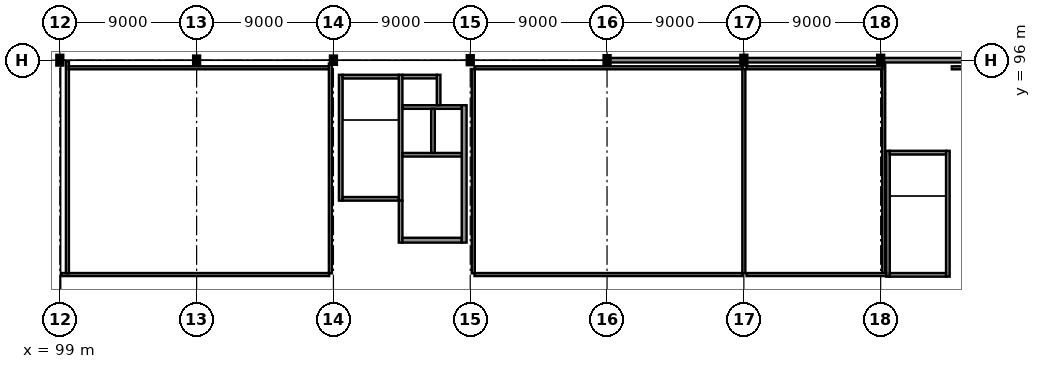
"""IFC4 building model, lengths in metres.
Left out: names, types, materials, properties, quantities, classifications, styles, units other than length and angle.
Written with IfcOpenShell. Run it as: python <this file> out.ifc"""

import sys

from ifc_helpers import new_model, si_unit, direction, frame, frame_2d, origin, origin_2d, place, context, subcontext, project, spatial, rectangle, i_section, extrude, element, fill, save


model = new_model("IFC4")
c1 = context("Model", 3, precision=1e-05, world=origin(), true_north=direction((0.0, 1.0)))
c2 = subcontext(c1, "Body", "Model", "MODEL_VIEW")
j1 = project(units=[si_unit("LENGTHUNIT", "METRE"), si_unit("PLANEANGLEUNIT", "RADIAN")], contexts=[c1])
p1 = place(None, origin())
s1 = spatial("IfcSite", under=j1, at=p1, CompositionType="ELEMENT")
p2 = place(p1, origin())
s2 = spatial("IfcBuilding", under=s1, at=p2, CompositionType="ELEMENT")
p3 = place(p2, frame((0.0, 0.0, 14.4)))
s3 = spatial("IfcBuildingStorey", under=s2, at=p3, CompositionType="ELEMENT", Elevation=14.4)
p4 = place(p3, frame((99.0, 96.0, 0.0), z_axis=(0.0, 0.0, 1.0), x_axis=(1.0, 0.0, 0.0)))
e1 = element("IfcColumn", 1, at=p4, inside=s3, PredefinedType="COLUMN", context=c2, shape_type="SweptSolid", body=[
    extrude(i_section(OverallWidth=0.3, OverallDepth=0.55, WebThickness=0.015, FlangeThickness=0.029, at=origin_2d()), origin(), (0.0, 0.0, 1.0), 4.5),
])
for number, where, z_axis, x_axis in (
    (2, (108.0, 96.0, 0.0), (0.0, 0.0, 1.0), (1.0, 0.0, 0.0)),
    (3, (117.0, 96.0, 0.0), (0.0, 0.0, 1.0), (1.0, 0.0, 0.0)),
):
    element("IfcColumn", number, at=place(p3, frame(where, z_axis=z_axis, x_axis=x_axis)), inside=s3, PredefinedType="COLUMN", context=c2, shape_type="SweptSolid", body=[
        extrude(i_section(OverallWidth=0.3, OverallDepth=0.45, WebThickness=0.014, FlangeThickness=0.026, at=origin_2d()), origin(), (0.0, 0.0, 1.0), 4.5),
    ])
for number, where, z_axis, x_axis in (
    (4, (126.0, 96.0, 0.0), (0.0, 0.0, 1.0), (0.0, 1.0, 0.0)),
    (5, (135.0, 96.0, 0.0), (0.0, 0.0, 1.0), (1.0, 0.0, 0.0)),
):
    element("IfcColumn", number, at=place(p3, frame(where, z_axis=z_axis, x_axis=x_axis)), inside=s3, PredefinedType="COLUMN", context=c2, shape_type="SweptSolid", body=[
        extrude(i_section(OverallWidth=0.3, OverallDepth=0.5, WebThickness=0.014, FlangeThickness=0.028, at=origin_2d()), origin(), (0.0, 0.0, 1.0), 4.5),
    ])
for number, where, z_axis, x_axis in (
    (6, (144.0, 96.0, 0.0), (0.0, 0.0, 1.0), (1.0, 0.0, 0.0)),
    (7, (153.0, 96.0, 0.0), (0.0, 0.0, 1.0), (1.0, 0.0, 0.0)),
):
    element("IfcColumn", number, at=place(p3, frame(where, z_axis=z_axis, x_axis=x_axis)), inside=s3, PredefinedType="COLUMN", context=c2, shape_type="SweptSolid", body=[
        extrude(i_section(OverallWidth=0.3, OverallDepth=0.55, WebThickness=0.015, FlangeThickness=0.029, at=origin_2d()), origin(), (0.0, 0.0, 1.0), 4.5),
    ])
p5 = place(p3, frame((161.992, 96.0, 0.0), z_axis=(0.0, 0.0, 1.0), x_axis=(-1.0, 0.0, 0.0)))
e8 = element("IfcWall", 8, at=p5, inside=s3, PredefinedType="SOLIDWALL", context=c2, shape_type="SweptSolid", body=[
    extrude(rectangle(XDim=8.984, YDim=0.3, at=frame_2d((4.492, 0.0))), origin(), (0.0, 0.0, 1.0), 3.187),
])
p6 = place(p5, frame((2.045, 0.0, 0.9)))
e9 = element("IfcOpeningElement", 9, at=p6, cuts=e8, PredefinedType="OPENING", context=c2, shape_type="SweptSolid", body=[
    extrude(rectangle(XDim=1.3, YDim=1.3, at=frame_2d((0.65, 0.65))), frame((0.0, 0.165, 0.0), z_axis=(0.0, -1.0, 0.0), x_axis=(1.0, 0.0, 0.0)), (0.0, 0.0, 1.0), 0.33),
])
p7 = place(p5, frame((5.639, 0.0, 0.9)))
e10 = element("IfcOpeningElement", 10, at=p7, cuts=e8, PredefinedType="OPENING", context=c2, shape_type="SweptSolid", body=[
    extrude(rectangle(XDim=1.3, YDim=1.3, at=frame_2d((0.65, 0.65))), frame((0.0, 0.165, 0.0), z_axis=(0.0, -1.0, 0.0), x_axis=(1.0, 0.0, 0.0)), (0.0, 0.0, 1.0), 0.33),
])
p8 = place(p3, frame((152.992, 96.0, 0.0), z_axis=(0.0, 0.0, 1.0), x_axis=(-1.0, 0.0, 0.0)))
e11 = element("IfcWall", 11, at=p8, inside=s3, PredefinedType="SOLIDWALL", context=c2, shape_type="SweptSolid", body=[
    extrude(rectangle(XDim=8.984, YDim=0.3, at=frame_2d((4.492, 0.0))), origin(), (0.0, 0.0, 1.0), 3.187),
])
p9 = place(p8, frame((2.045, 0.0, 0.9)))
e12 = element("IfcOpeningElement", 12, at=p9, cuts=e11, PredefinedType="OPENING", context=c2, shape_type="SweptSolid", body=[
    extrude(rectangle(XDim=1.3, YDim=1.3, at=frame_2d((0.65, 0.65))), frame((0.0, 0.165, 0.0), z_axis=(0.0, -1.0, 0.0), x_axis=(1.0, 0.0, 0.0)), (0.0, 0.0, 1.0), 0.33),
])
p10 = place(p8, frame((5.639, 0.0, 0.9)))
e13 = element("IfcOpeningElement", 13, at=p10, cuts=e11, PredefinedType="OPENING", context=c2, shape_type="SweptSolid", body=[
    extrude(rectangle(XDim=1.3, YDim=1.3, at=frame_2d((0.65, 0.65))), frame((0.0, 0.165, 0.0), z_axis=(0.0, -1.0, 0.0), x_axis=(1.0, 0.0, 0.0)), (0.0, 0.0, 1.0), 0.33),
])
p11 = place(p3, frame((143.992, 96.0, 0.0), z_axis=(0.0, 0.0, 1.0), x_axis=(-1.0, 0.0, 0.0)))
e14 = element("IfcWall", 14, at=p11, inside=s3, PredefinedType="SOLIDWALL", context=c2, shape_type="SweptSolid", body=[
    extrude(rectangle(XDim=8.984, YDim=0.3, at=frame_2d((4.492, 0.0))), origin(), (0.0, 0.0, 1.0), 3.187),
])
p12 = place(p11, frame((2.045, 0.0, 0.9)))
e15 = element("IfcOpeningElement", 15, at=p12, cuts=e14, PredefinedType="OPENING", context=c2, shape_type="SweptSolid", body=[
    extrude(rectangle(XDim=1.3, YDim=1.3, at=frame_2d((0.65, 0.65))), frame((0.0, 0.165, 0.0), z_axis=(0.0, -1.0, 0.0), x_axis=(1.0, 0.0, 0.0)), (0.0, 0.0, 1.0), 0.33),
])
p13 = place(p11, frame((5.639, 0.0, 0.9)))
e16 = element("IfcOpeningElement", 16, at=p13, cuts=e14, PredefinedType="OPENING", context=c2, shape_type="SweptSolid", body=[
    extrude(rectangle(XDim=1.3, YDim=1.3, at=frame_2d((0.65, 0.65))), frame((0.0, 0.165, 0.0), z_axis=(0.0, -1.0, 0.0), x_axis=(1.0, 0.0, 0.0)), (0.0, 0.0, 1.0), 0.33),
])
p14 = place(p3, frame((117.48, 86.76, 0.0), z_axis=(0.0, 0.0, 1.0), x_axis=(0.0, 1.0, 0.0)))
e17 = element("IfcWall", 17, at=p14, inside=s3, PredefinedType="SHEAR", context=c2, shape_type="SweptSolid", body=[
    extrude(rectangle(XDim=8.28, YDim=0.24, at=frame_2d((4.14, 0.0))), origin(), (0.0, 0.0, 1.0), 4.31),
])
p15 = place(p3, frame((121.42, 86.76, 0.0), z_axis=(0.0, 0.0, 1.0), x_axis=(0.0, 1.0, 0.0)))
e18 = element("IfcWall", 18, at=p15, inside=s3, PredefinedType="SHEAR", context=c2, shape_type="SweptSolid", body=[
    extrude(rectangle(XDim=8.28, YDim=0.24, at=frame_2d((4.14, 0.0))), origin(), (0.0, 0.0, 1.0), 4.31),
])
p16 = place(p15, frame((0.54, 0.0, 0.0)))
e19 = element("IfcOpeningElement", 19, at=p16, cuts=e18, PredefinedType="OPENING", context=c2, shape_type="SweptSolid", body=[
    extrude(rectangle(XDim=1.2, YDim=2.15, at=frame_2d((0.6, 1.075))), frame((0.0, 0.135, 0.0), z_axis=(0.0, -1.0, 0.0), x_axis=(1.0, 0.0, 0.0)), (0.0, 0.0, 1.0), 0.27),
])
for number, where, z_axis, x_axis in (
    (20, (117.6, 86.88, 0.0), (0.0, 0.0, 1.0), (1.0, 0.0, 0.0)),
    (21, (117.6, 94.92, 0.0), (0.0, 0.0, 1.0), (1.0, 0.0, 0.0)),
):
    element("IfcWall", number, at=place(p3, frame(where, z_axis=z_axis, x_axis=x_axis)), inside=s3, PredefinedType="SHEAR", context=c2, shape_type="SweptSolid", body=[
        extrude(rectangle(XDim=3.7, YDim=0.24, at=frame_2d((1.85, 0.0))), origin(), (0.0, 0.0, 1.0), 4.31),
    ])
p17 = place(p3, frame((153.48, 81.76, 0.0), z_axis=(0.0, 0.0, 1.0), x_axis=(0.0, 1.0, 0.0)))
e22 = element("IfcWall", 22, at=p17, inside=s3, PredefinedType="SHEAR", context=c2, shape_type="SweptSolid", body=[
    extrude(rectangle(XDim=8.28, YDim=0.24, at=frame_2d((4.14, 0.0))), origin(), (0.0, 0.0, 1.0), 4.31),
])
p18 = place(p3, frame((157.42, 81.76, 0.0), z_axis=(0.0, 0.0, 1.0), x_axis=(0.0, 1.0, 0.0)))
e23 = element("IfcWall", 23, at=p18, inside=s3, PredefinedType="SHEAR", context=c2, shape_type="SweptSolid", body=[
    extrude(rectangle(XDim=8.28, YDim=0.24, at=frame_2d((4.14, 0.0))), origin(), (0.0, 0.0, 1.0), 4.31),
])
p19 = place(p18, frame((0.49, 0.0, 0.0)))
e24 = element("IfcOpeningElement", 24, at=p19, cuts=e23, PredefinedType="OPENING", context=c2, shape_type="SweptSolid", body=[
    extrude(rectangle(XDim=1.3, YDim=2.2, at=frame_2d((0.65, 1.1))), frame((0.0, 0.135, 0.0), z_axis=(0.0, -1.0, 0.0), x_axis=(1.0, 0.0, 0.0)), (0.0, 0.0, 1.0), 0.27),
])
for number, where, z_axis, x_axis in (
    (25, (153.6, 81.88, 0.0), (0.0, 0.0, 1.0), (1.0, 0.0, 0.0)),
    (26, (153.6, 89.92, 0.0), (0.0, 0.0, 1.0), (1.0, 0.0, 0.0)),
):
    element("IfcWall", number, at=place(p3, frame(where, z_axis=z_axis, x_axis=x_axis)), inside=s3, PredefinedType="SHEAR", context=c2, shape_type="SweptSolid", body=[
        extrude(rectangle(XDim=3.7, YDim=0.24, at=frame_2d((1.85, 0.0))), origin(), (0.0, 0.0, 1.0), 4.31),
    ])
p20 = place(p3, frame((121.42, 84.0, 0.0), z_axis=(0.0, 0.0, 1.0), x_axis=(0.0, 1.0, 0.0)))
e27 = element("IfcWall", 27, at=p20, inside=s3, PredefinedType="SHEAR", context=c2, shape_type="SweptSolid", body=[
    extrude(rectangle(XDim=2.76, YDim=0.24, at=frame_2d((1.38, 0.0))), origin(), (0.0, 0.0, 1.0), 4.16),
])
p21 = place(p3, frame((121.54, 84.16, 0.0), z_axis=(0.0, 0.0, 1.0), x_axis=(1.0, 0.0, 0.0)))
e28 = element("IfcWall", 28, at=p21, inside=s3, PredefinedType="SHEAR", context=c2, shape_type="SweptSolid", body=[
    extrude(rectangle(XDim=3.9, YDim=0.32, at=frame_2d((1.95, 0.0))), origin(), (0.0, 0.0, 1.0), 4.16),
])
p22 = place(p21, frame((1.225, 0.0, 0.0)))
e29 = element("IfcOpeningElement", 29, at=p22, cuts=e28, PredefinedType="OPENING", context=c2, shape_type="SweptSolid", body=[
    extrude(rectangle(XDim=1.45, YDim=2.2, at=frame_2d((0.725, 1.1))), frame((0.0, 0.175, 0.0), z_axis=(0.0, -1.0, 0.0), x_axis=(1.0, 0.0, 0.0)), (0.0, 0.0, 1.0), 0.35),
])
p23 = place(p3, frame((125.6, 84.0, 0.0), z_axis=(0.0, 0.0, 1.0), x_axis=(0.0, 1.0, 0.0)))
e30 = element("IfcWall", 30, at=p23, inside=s3, PredefinedType="SHEAR", context=c2, shape_type="SweptSolid", body=[
    extrude(rectangle(XDim=9.04, YDim=0.32, at=frame_2d((4.52, 0.0))), origin(), (0.0, 0.0, 1.0), 4.16),
])
p24 = place(p3, frame((121.54, 89.78, 0.0), z_axis=(0.0, 0.0, 1.0), x_axis=(1.0, 0.0, 0.0)))
e31 = element("IfcWall", 31, at=p24, inside=s3, PredefinedType="SHEAR", context=c2, shape_type="SweptSolid", body=[
    extrude(rectangle(XDim=3.9, YDim=0.24, at=frame_2d((1.95, 0.0))), origin(), (0.0, 0.0, 1.0), 4.31),
])
p25 = place(p24, frame((0.385, 0.0, 0.0)))
e32 = element("IfcOpeningElement", 32, at=p25, cuts=e31, PredefinedType="OPENING", context=c2, shape_type="SweptSolid", body=[
    extrude(rectangle(XDim=1.3, YDim=2.2, at=frame_2d((0.65, 1.1))), frame((0.0, 0.135, 0.0), z_axis=(0.0, -1.0, 0.0), x_axis=(1.0, 0.0, 0.0)), (0.0, 0.0, 1.0), 0.27),
])
p26 = place(p24, frame((2.335, 0.0, 0.0)))
e33 = element("IfcOpeningElement", 33, at=p26, cuts=e31, PredefinedType="OPENING", context=c2, shape_type="SweptSolid", body=[
    extrude(rectangle(XDim=1.3, YDim=2.2, at=frame_2d((0.65, 1.1))), frame((0.0, 0.135, 0.0), z_axis=(0.0, -1.0, 0.0), x_axis=(1.0, 0.0, 0.0)), (0.0, 0.0, 1.0), 0.27),
])
p27 = place(p3, frame((121.54, 92.92, 0.0), z_axis=(0.0, 0.0, 1.0), x_axis=(1.0, 0.0, 0.0)))
e34 = element("IfcWall", 34, at=p27, inside=s3, PredefinedType="SHEAR", context=c2, shape_type="SweptSolid", body=[
    extrude(rectangle(XDim=3.9, YDim=0.24, at=frame_2d((1.95, 0.0))), origin(), (0.0, 0.0, 1.0), 4.31),
])
p28 = place(p3, frame((123.55, 89.9, 0.0), z_axis=(0.0, 0.0, 1.0), x_axis=(0.0, 1.0, 0.0)))
e35 = element("IfcWall", 35, at=p28, inside=s3, PredefinedType="SHEAR", context=c2, shape_type="SweptSolid", body=[
    extrude(rectangle(XDim=2.9, YDim=0.24, at=frame_2d((1.45, 0.0))), origin(), (0.0, 0.0, 1.0), 4.31),
])
p29 = place(p3, frame((123.92, 93.04, 0.0), z_axis=(0.0, 0.0, 1.0), x_axis=(0.0, 1.0, 0.0)))
e36 = element("IfcWall", 36, at=p29, inside=s3, PredefinedType="SHEAR", context=c2, shape_type="SweptSolid", body=[
    extrude(rectangle(XDim=2.0, YDim=0.24, at=frame_2d((1.0, 0.0))), origin(), (0.0, 0.0, 1.0), 4.31),
])
p30 = place(p3, frame((121.54, 94.92, 0.0), z_axis=(0.0, 0.0, 1.0), x_axis=(1.0, 0.0, 0.0)))
e37 = element("IfcWall", 37, at=p30, inside=s3, PredefinedType="SHEAR", context=c2, shape_type="SweptSolid", body=[
    extrude(rectangle(XDim=2.26, YDim=0.24, at=frame_2d((1.13, 0.0))), origin(), (0.0, 0.0, 1.0), 4.31),
])
p31 = place(p3, frame((116.72, 81.9, 0.0), z_axis=(0.0, 0.0, 1.0), x_axis=(-1.0, 0.0, 0.0)))
e38 = element("IfcWall", 38, at=p31, inside=s3, PredefinedType="PARTITIONING", context=c2, shape_type="SweptSolid", body=[
    extrude(rectangle(XDim=17.595, YDim=0.2, at=frame_2d((8.797, 0.0))), origin(), (0.0, 0.0, 1.0), 4.14),
])
p32 = place(p31, frame((7.947, 0.0, 0.0)))
e39 = element("IfcOpeningElement", 39, at=p32, cuts=e38, PredefinedType="OPENING", context=c2, shape_type="SweptSolid", body=[
    extrude(rectangle(XDim=1.7, YDim=2.4, at=frame_2d((0.85, 1.2))), frame((0.0, 0.115, 0.0), z_axis=(0.0, -1.0, 0.0), x_axis=(1.0, 0.0, 0.0)), (0.0, 0.0, 1.0), 0.23),
])
p33 = place(p3, frame((99.5, 81.98, 0.0), z_axis=(0.0, 0.0, 1.0), x_axis=(0.0, 1.0, 0.0)))
e40 = element("IfcWall", 40, at=p33, inside=s3, PredefinedType="PARTITIONING", context=c2, shape_type="SweptSolid", body=[
    extrude(rectangle(XDim=13.945, YDim=0.2, at=frame_2d((6.973, 0.0))), origin(), (0.0, 0.0, 1.0), 4.14),
])
p34 = place(p3, frame((99.58, 95.5, 0.0), z_axis=(0.0, 0.0, 1.0), x_axis=(1.0, 0.0, 0.0)))
e41 = element("IfcWall", 41, at=p34, inside=s3, PredefinedType="PARTITIONING", context=c2, shape_type="SweptSolid", body=[
    extrude(rectangle(XDim=17.14, YDim=0.2, at=frame_2d((8.57, 0.0))), origin(), (0.0, 0.0, 1.0), 4.14),
])
p35 = place(p3, frame((116.8, 95.777, 0.0), z_axis=(0.0, 0.0, 1.0), x_axis=(0.0, -1.0, 0.0)))
e42 = element("IfcWall", 42, at=p35, inside=s3, PredefinedType="PARTITIONING", context=c2, shape_type="SweptSolid", body=[
    extrude(rectangle(XDim=13.797, YDim=0.2, at=frame_2d((6.898, 0.0))), origin(), (0.0, 0.0, 1.0), 3.505),
])
p36 = place(p3, frame((126.2, 81.98, 0.0), z_axis=(0.0, 0.0, 1.0), x_axis=(0.0, 1.0, 0.0)))
e43 = element("IfcWall", 43, at=p36, inside=s3, PredefinedType="PARTITIONING", context=c2, shape_type="SweptSolid", body=[
    extrude(rectangle(XDim=13.44, YDim=0.2, at=frame_2d((6.72, 0.0))), origin(), (0.0, 0.0, 1.0), 3.405),
])
p37 = place(p3, frame((126.28, 95.5, 0.0), z_axis=(0.0, 0.0, 1.0), x_axis=(1.0, 0.0, 0.0)))
e44 = element("IfcWall", 44, at=p37, inside=s3, PredefinedType="PARTITIONING", context=c2, shape_type="SweptSolid", body=[
    extrude(rectangle(XDim=17.64, YDim=0.2, at=frame_2d((8.82, 0.0))), origin(), (0.0, 0.0, 1.0), 4.14),
])
p38 = place(p3, frame((144.0, 95.42, 0.0), z_axis=(0.0, 0.0, 1.0), x_axis=(0.0, -1.0, 0.0)))
e45 = element("IfcWall", 45, at=p38, inside=s3, PredefinedType="PARTITIONING", context=c2, shape_type="SweptSolid", body=[
    extrude(rectangle(XDim=13.44, YDim=0.2, at=frame_2d((6.72, 0.0))), origin(), (0.0, 0.0, 1.0), 3.545),
])
p39 = place(p3, frame((143.92, 81.9, 0.0), z_axis=(0.0, 0.0, 1.0), x_axis=(-1.0, 0.0, 0.0)))
e46 = element("IfcWall", 46, at=p39, inside=s3, PredefinedType="PARTITIONING", context=c2, shape_type="SweptSolid", body=[
    extrude(rectangle(XDim=17.64, YDim=0.2, at=frame_2d((8.82, 0.0))), origin(), (0.0, 0.0, 1.0), 4.14),
])
p40 = place(p39, frame((7.82, 0.0, 0.0)))
e47 = element("IfcOpeningElement", 47, at=p40, cuts=e46, PredefinedType="OPENING", context=c2, shape_type="SweptSolid", body=[
    extrude(rectangle(XDim=2.0, YDim=2.6, at=frame_2d((1.0, 1.3))), frame((0.0, 0.115, 0.0), z_axis=(0.0, -1.0, 0.0), x_axis=(1.0, 0.0, 0.0)), (0.0, 0.0, 1.0), 0.23),
])
p41 = place(p3, frame((153.2, 95.727, 0.0), z_axis=(0.0, 0.0, 1.0), x_axis=(0.0, -1.0, 0.0)))
e48 = element("IfcWall", 48, at=p41, inside=s3, PredefinedType="PARTITIONING", context=c2, shape_type="SweptSolid", body=[
    extrude(rectangle(XDim=13.747, YDim=0.2, at=frame_2d((6.874, 0.0))), origin(), (0.0, 0.0, 1.0), 3.495),
])
p42 = place(p3, frame((153.365, 81.9, 0.0), z_axis=(0.0, 0.0, 1.0), x_axis=(-1.0, 0.0, 0.0)))
e49 = element("IfcWall", 49, at=p42, inside=s3, PredefinedType="PARTITIONING", context=c2, shape_type="SweptSolid", body=[
    extrude(rectangle(XDim=9.185, YDim=0.2, at=frame_2d((4.593, 0.0))), origin(), (0.0, 0.0, 1.0), 4.14),
])
p43 = place(p42, frame((3.643, 0.0, 0.0)))
e50 = element("IfcOpeningElement", 50, at=p43, cuts=e49, PredefinedType="OPENING", context=c2, shape_type="SweptSolid", body=[
    extrude(rectangle(XDim=1.9, YDim=2.5, at=frame_2d((0.95, 1.25))), frame((0.0, 0.115, 0.0), z_axis=(0.0, -1.0, 0.0), x_axis=(1.0, 0.0, 0.0)), (0.0, 0.0, 1.0), 0.23),
])
p44 = place(p3, frame((144.18, 95.5, 0.0), z_axis=(0.0, 0.0, 1.0), x_axis=(1.0, 0.0, 0.0)))
e51 = element("IfcWall", 51, at=p44, inside=s3, PredefinedType="PARTITIONING", context=c2, shape_type="SweptSolid", body=[
    extrude(rectangle(XDim=8.94, YDim=0.2, at=frame_2d((4.47, 0.0))), origin(), (0.0, 0.0, 1.0), 4.14),
])
p45 = place(p3, frame((157.68, 95.5, 0.0), z_axis=(0.0, 0.0, 1.0), x_axis=(1.0, 0.0, 0.0)))
e52 = element("IfcWall", 52, at=p45, inside=s3, PredefinedType="PARTITIONING", context=c2, shape_type="SweptSolid", body=[
    extrude(rectangle(XDim=16.34, YDim=0.2, at=frame_2d((8.17, 0.0))), origin(), (0.0, 0.0, 1.0), 4.14),
])
p46 = place(p7, origin())
e53 = element("IfcWindow", 53, at=p46, inside=s3, PartitioningType="SINGLE_PANEL", PredefinedType="WINDOW", context=c2, shape_type="SweptSolid", body=[
    extrude(rectangle(XDim=1.3, YDim=1.3, at=frame_2d((0.65, 0.65))), frame((0.0, 0.03, 0.0), z_axis=(0.0, -1.0, 0.0), x_axis=(1.0, 0.0, 0.0)), (0.0, 0.0, 1.0), 0.06),
])
fill(e10, e53)
p47 = place(p9, origin())
e54 = element("IfcWindow", 54, at=p47, inside=s3, PartitioningType="SINGLE_PANEL", PredefinedType="WINDOW", context=c2, shape_type="SweptSolid", body=[
    extrude(rectangle(XDim=1.3, YDim=1.3, at=frame_2d((0.65, 0.65))), frame((0.0, 0.03, 0.0), z_axis=(0.0, -1.0, 0.0), x_axis=(1.0, 0.0, 0.0)), (0.0, 0.0, 1.0), 0.06),
])
fill(e12, e54)
p48 = place(p10, origin())
e55 = element("IfcWindow", 55, at=p48, inside=s3, PartitioningType="SINGLE_PANEL", PredefinedType="WINDOW", context=c2, shape_type="SweptSolid", body=[
    extrude(rectangle(XDim=1.3, YDim=1.3, at=frame_2d((0.65, 0.65))), frame((0.0, 0.03, 0.0), z_axis=(0.0, -1.0, 0.0), x_axis=(1.0, 0.0, 0.0)), (0.0, 0.0, 1.0), 0.06),
])
fill(e13, e55)
p49 = place(p12, origin())
e56 = element("IfcWindow", 56, at=p49, inside=s3, PartitioningType="SINGLE_PANEL", PredefinedType="WINDOW", context=c2, shape_type="SweptSolid", body=[
    extrude(rectangle(XDim=1.3, YDim=1.3, at=frame_2d((0.65, 0.65))), frame((0.0, 0.03, 0.0), z_axis=(0.0, -1.0, 0.0), x_axis=(1.0, 0.0, 0.0)), (0.0, 0.0, 1.0), 0.06),
])
fill(e15, e56)
p50 = place(p13, origin())
e57 = element("IfcWindow", 57, at=p50, inside=s3, PartitioningType="SINGLE_PANEL", PredefinedType="WINDOW", context=c2, shape_type="SweptSolid", body=[
    extrude(rectangle(XDim=1.3, YDim=1.3, at=frame_2d((0.65, 0.65))), frame((0.0, 0.03, 0.0), z_axis=(0.0, -1.0, 0.0), x_axis=(1.0, 0.0, 0.0)), (0.0, 0.0, 1.0), 0.06),
])
fill(e16, e57)
p51 = place(p16, frame((1.2, 0.0, 0.0), z_axis=(0.0, 0.0, 1.0), x_axis=(-1.0, 0.0, 0.0)))
e58 = element("IfcDoor", 58, at=p51, inside=s3, OperationType="SINGLE_SWING_LEFT", PredefinedType="DOOR", context=c2, shape_type="SweptSolid", body=[
    extrude(rectangle(XDim=1.2, YDim=2.15, at=frame_2d((0.6, 1.075))), frame((0.0, 0.025, 0.0), z_axis=(0.0, -1.0, 0.0), x_axis=(1.0, 0.0, 0.0)), (0.0, 0.0, 1.0), 0.05),
])
fill(e19, e58)
p52 = place(p19, frame((1.3, 0.0, 0.0), z_axis=(0.0, 0.0, 1.0), x_axis=(-1.0, 0.0, 0.0)))
e59 = element("IfcDoor", 59, at=p52, inside=s3, OperationType="SINGLE_SWING_RIGHT", PredefinedType="DOOR", context=c2, shape_type="SweptSolid", body=[
    extrude(rectangle(XDim=1.3, YDim=2.2, at=frame_2d((0.65, 1.1))), frame((0.0, 0.025, 0.0), z_axis=(0.0, -1.0, 0.0), x_axis=(1.0, 0.0, 0.0)), (0.0, 0.0, 1.0), 0.05),
])
fill(e24, e59)
p53 = place(p22, origin())
e60 = element("IfcDoor", 60, at=p53, inside=s3, OperationType="DOUBLE_DOOR_SINGLE_SWING", PredefinedType="DOOR", context=c2, shape_type="SweptSolid", body=[
    extrude(rectangle(XDim=1.45, YDim=2.2, at=frame_2d((0.725, 1.1))), frame((0.0, 0.025, 0.0), z_axis=(0.0, -1.0, 0.0), x_axis=(1.0, 0.0, 0.0)), (0.0, 0.0, 1.0), 0.05),
])
fill(e29, e60)
p54 = place(p25, origin())
e61 = element("IfcDoor", 61, at=p54, inside=s3, OperationType="DOUBLE_DOOR_SLIDING", PredefinedType="DOOR", context=c2, shape_type="SweptSolid", body=[
    extrude(rectangle(XDim=1.3, YDim=2.2, at=frame_2d((0.65, 1.1))), frame((0.0, 0.025, 0.0), z_axis=(0.0, -1.0, 0.0), x_axis=(1.0, 0.0, 0.0)), (0.0, 0.0, 1.0), 0.05),
])
fill(e32, e61)
p55 = place(p26, origin())
e62 = element("IfcDoor", 62, at=p55, inside=s3, OperationType="DOUBLE_DOOR_SLIDING", PredefinedType="DOOR", context=c2, shape_type="SweptSolid", body=[
    extrude(rectangle(XDim=1.3, YDim=2.2, at=frame_2d((0.65, 1.1))), frame((0.0, 0.025, 0.0), z_axis=(0.0, -1.0, 0.0), x_axis=(1.0, 0.0, 0.0)), (0.0, 0.0, 1.0), 0.05),
])
fill(e33, e62)
p56 = place(p32, frame((1.7, 0.0, 0.0), z_axis=(0.0, 0.0, 1.0), x_axis=(-1.0, 0.0, 0.0)))
e63 = element("IfcDoor", 63, at=p56, inside=s3, OperationType="DOUBLE_DOOR_SINGLE_SWING", PredefinedType="DOOR", context=c2, shape_type="SweptSolid", body=[
    extrude(rectangle(XDim=1.7, YDim=2.4, at=frame_2d((0.85, 1.2))), frame((0.0, 0.025, 0.0), z_axis=(0.0, -1.0, 0.0), x_axis=(1.0, 0.0, 0.0)), (0.0, 0.0, 1.0), 0.05),
])
fill(e39, e63)
p57 = place(p40, origin())
e64 = element("IfcDoor", 64, at=p57, inside=s3, OperationType="DOUBLE_DOOR_SINGLE_SWING", PredefinedType="DOOR", context=c2, shape_type="SweptSolid", body=[
    extrude(rectangle(XDim=2.0, YDim=2.6, at=frame_2d((1.0, 1.3))), frame((0.0, 0.025, 0.0), z_axis=(0.0, -1.0, 0.0), x_axis=(1.0, 0.0, 0.0)), (0.0, 0.0, 1.0), 0.05),
])
fill(e47, e64)
p58 = place(p43, frame((1.9, 0.0, 0.0), z_axis=(0.0, 0.0, 1.0), x_axis=(-1.0, 0.0, 0.0)))
e65 = element("IfcDoor", 65, at=p58, inside=s3, OperationType="DOUBLE_DOOR_SINGLE_SWING", PredefinedType="DOOR", context=c2, shape_type="SweptSolid", body=[
    extrude(rectangle(XDim=1.9, YDim=2.5, at=frame_2d((0.95, 1.25))), frame((0.0, 0.025, 0.0), z_axis=(0.0, -1.0, 0.0), x_axis=(1.0, 0.0, 0.0)), (0.0, 0.0, 1.0), 0.05),
])
fill(e50, e65)
save(model, sys.argv[1])
